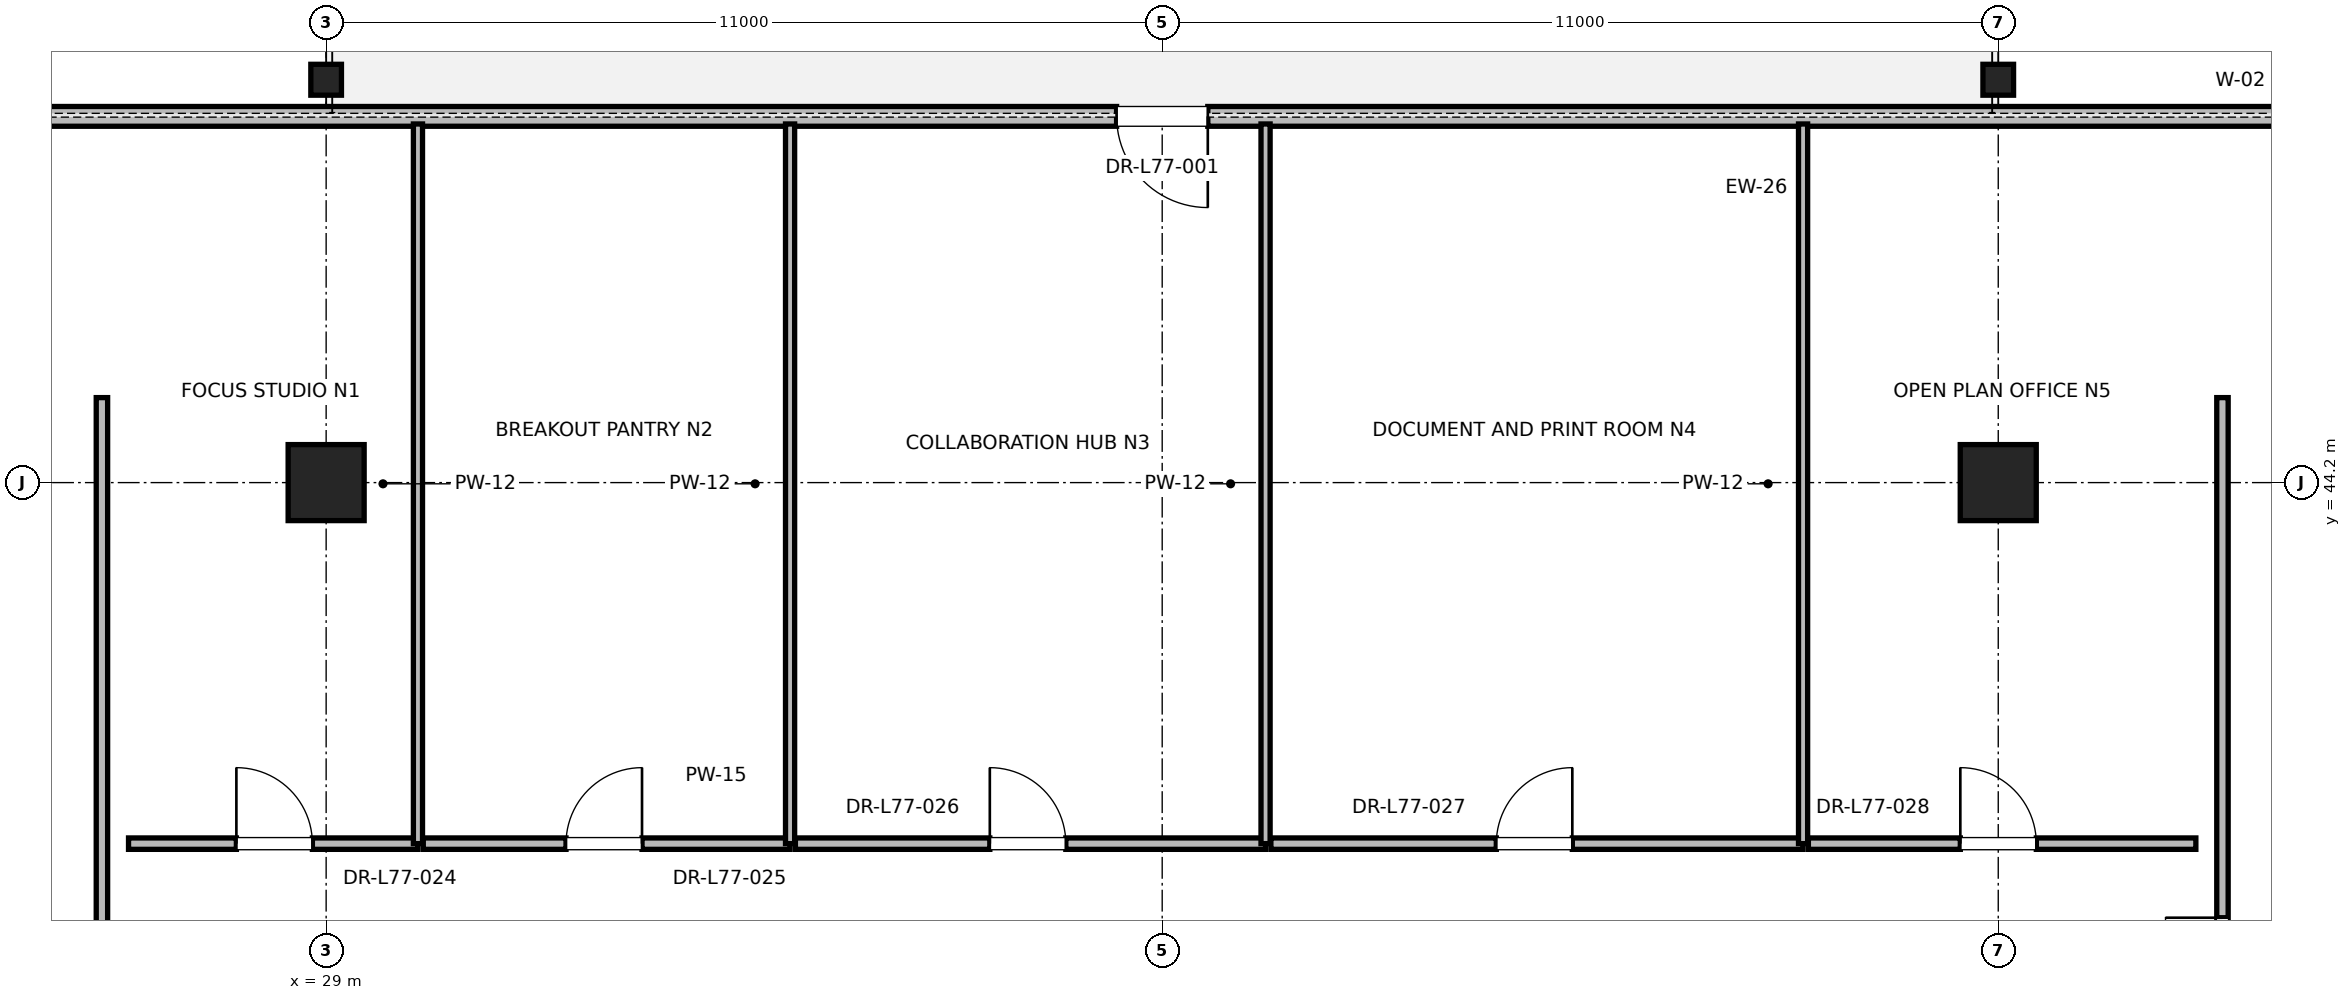
"""IFC4 building model, lengths in metres.
Left out: names, types, materials, properties, quantities, classifications, styles, units other than length and angle.
Written with IfcOpenShell. Run it as: python <this file> out.ifc"""

import sys

from ifc_helpers import new_model, si_unit, direction, frame, frame_2d, origin, origin_2d, place, context, subcontext, project, spatial, rectangle, i_section, extrude, element, fill, save


model = new_model("IFC4")
c1 = context("Model", 3, precision=1e-05, world=origin(), true_north=direction((0.0, 1.0)))
c2 = subcontext(c1, "Body", "Model", "MODEL_VIEW")
j1 = project(units=[si_unit("LENGTHUNIT", "METRE"), si_unit("PLANEANGLEUNIT", "RADIAN")], contexts=[c1])
p1 = place(None, origin())
s1 = spatial("IfcSite", under=j1, at=p1, CompositionType="ELEMENT")
p2 = place(p1, origin())
s2 = spatial("IfcBuilding", under=s1, at=p2, CompositionType="ELEMENT")
p3 = place(p2, frame((0.0, 0.0, 330.8)))
s3 = spatial("IfcBuildingStorey", under=s2, at=p3, CompositionType="ELEMENT", Elevation=330.8)
for number, where, z_axis, x_axis in (
    (1, (29.0, 44.2, 0.0), (0.0, 0.0, 1.0), (1.0, 0.0, 0.0)),
    (2, (51.0, 44.2, 0.0), (0.0, 0.0, 1.0), (1.0, 0.0, 0.0)),
):
    element("IfcColumn", number, at=place(p3, frame(where, z_axis=z_axis, x_axis=x_axis)), inside=s3, PredefinedType="COLUMN", context=c2, shape_type="SweptSolid", body=[
        extrude(rectangle(XDim=1.0, YDim=1.0, at=origin_2d()), origin(), (0.0, 0.0, 1.0), 4.0),
    ])
for number, where, z_axis, x_axis in (
    (3, (29.0, 49.5, 0.0), (0.0, 0.0, 1.0), (1.0, 0.0, 0.0)),
    (4, (51.0, 49.5, 0.0), (0.0, 0.0, 1.0), (1.0, 0.0, 0.0)),
):
    element("IfcColumn", number, at=place(p3, frame(where, z_axis=z_axis, x_axis=x_axis)), inside=s3, PredefinedType="COLUMN", context=c2, shape_type="SweptSolid", body=[
        extrude(i_section(OverallWidth=0.403, OverallDepth=0.406, WebThickness=0.027, FlangeThickness=0.043, FilletRadius=0.015, at=origin_2d()), origin(), (0.0, 0.0, 1.0), 4.0),
    ])
p4 = place(p3, frame((60.836, 49.018, 0.0), z_axis=(0.0, 0.0, 1.0), x_axis=(-1.0, 0.0, 0.0)))
e5 = element("IfcWall", 5, at=p4, inside=s3, PredefinedType="PARAPET", context=c2, shape_type="SweptSolid", body=[
    extrude(rectangle(XDim=41.673, YDim=0.26, at=frame_2d((20.836, 0.0))), origin(), (0.0, 0.0, 1.0), 3.196),
])
p5 = place(p4, frame((4.2, 0.0, 0.85)))
e6 = element("IfcOpeningElement", 6, at=p5, cuts=e5, PredefinedType="OPENING", context=c2, shape_type="SweptSolid", body=[
    extrude(rectangle(XDim=1.6, YDim=2.1, at=frame_2d((0.8, 1.05))), frame((0.0, 0.13, 0.0), z_axis=(0.0, -1.0, 0.0), x_axis=(1.0, 0.0, 0.0)), (0.0, 0.0, 1.0), 0.26),
])
p6 = place(p4, frame((20.236, 0.0, 0.0)))
e7 = element("IfcOpeningElement", 7, at=p6, cuts=e5, PredefinedType="OPENING", context=c2, shape_type="SweptSolid", body=[
    extrude(rectangle(XDim=1.2, YDim=2.2, at=frame_2d((0.6, 1.1))), frame((0.0, 0.13, 0.0), z_axis=(0.0, -1.0, 0.0), x_axis=(1.0, 0.0, 0.0)), (0.0, 0.0, 1.0), 0.26),
])
p7 = place(p4, frame((35.873, 0.0, 0.85)))
e8 = element("IfcOpeningElement", 8, at=p7, cuts=e5, PredefinedType="OPENING", context=c2, shape_type="SweptSolid", body=[
    extrude(rectangle(XDim=1.6, YDim=2.1, at=frame_2d((0.8, 1.05))), frame((0.0, 0.13, 0.0), z_axis=(0.0, -1.0, 0.0), x_axis=(1.0, 0.0, 0.0)), (0.0, 0.0, 1.0), 0.26),
])
p8 = place(p3, frame((26.4, 39.45, 0.0), z_axis=(0.0, 0.0, 1.0), x_axis=(1.0, 0.0, 0.0)))
e9 = element("IfcWall", 9, at=p8, inside=s3, PredefinedType="PARTITIONING", context=c2, shape_type="SweptSolid", body=[
    extrude(rectangle(XDim=3.808, YDim=0.15, at=frame_2d((1.904, 0.0))), origin(), (0.0, 0.0, 1.0), 2.85),
])
p9 = place(p8, frame((1.419, 0.0, 0.0)))
e10 = element("IfcOpeningElement", 10, at=p9, cuts=e9, PredefinedType="OPENING", context=c2, shape_type="SweptSolid", body=[
    extrude(rectangle(XDim=1.0, YDim=2.15, at=frame_2d((0.5, 1.075))), frame((0.0, 0.075, 0.0), z_axis=(0.0, -1.0, 0.0), x_axis=(1.0, 0.0, 0.0)), (0.0, 0.0, 1.0), 0.15),
])
p10 = place(p3, frame((30.208, 39.45, 0.0), z_axis=(0.0, 0.0, 1.0), x_axis=(0.0, 1.0, 0.0)))
e11 = element("IfcWall", 11, at=p10, inside=s3, PredefinedType="PARTITIONING", context=c2, shape_type="SweptSolid", body=[
    extrude(rectangle(XDim=9.468, YDim=0.12, at=frame_2d((4.734, 0.0))), origin(), (0.0, 0.0, 1.0), 2.415),
])
p11 = place(p3, frame((30.278, 39.45, 0.0), z_axis=(0.0, 0.0, 1.0), x_axis=(1.0, 0.0, 0.0)))
e12 = element("IfcWall", 12, at=p11, inside=s3, PredefinedType="PARTITIONING", context=c2, shape_type="SweptSolid", body=[
    extrude(rectangle(XDim=4.826, YDim=0.15, at=frame_2d((2.413, 0.0))), origin(), (0.0, 0.0, 1.0), 2.85),
])
p12 = place(p11, frame((1.878, 0.0, 0.0)))
e13 = element("IfcOpeningElement", 13, at=p12, cuts=e12, PredefinedType="OPENING", context=c2, shape_type="SweptSolid", body=[
    extrude(rectangle(XDim=1.0, YDim=2.15, at=frame_2d((0.5, 1.075))), frame((0.0, 0.075, 0.0), z_axis=(0.0, -1.0, 0.0), x_axis=(1.0, 0.0, 0.0)), (0.0, 0.0, 1.0), 0.15),
])
p13 = place(p3, frame((35.104, 39.45, 0.0), z_axis=(0.0, 0.0, 1.0), x_axis=(0.0, 1.0, 0.0)))
e14 = element("IfcWall", 14, at=p13, inside=s3, PredefinedType="PARTITIONING", context=c2, shape_type="SweptSolid", body=[
    extrude(rectangle(XDim=9.468, YDim=0.12, at=frame_2d((4.734, 0.0))), origin(), (0.0, 0.0, 1.0), 2.415),
])
p14 = place(p3, frame((35.174, 39.45, 0.0), z_axis=(0.0, 0.0, 1.0), x_axis=(1.0, 0.0, 0.0)))
e15 = element("IfcWall", 15, at=p14, inside=s3, PredefinedType="PARTITIONING", context=c2, shape_type="SweptSolid", body=[
    extrude(rectangle(XDim=6.186, YDim=0.15, at=frame_2d((3.093, 0.0))), origin(), (0.0, 0.0, 1.0), 2.85),
])
p15 = place(p14, frame((2.558, 0.0, 0.0)))
e16 = element("IfcOpeningElement", 16, at=p15, cuts=e15, PredefinedType="OPENING", context=c2, shape_type="SweptSolid", body=[
    extrude(rectangle(XDim=1.0, YDim=2.15, at=frame_2d((0.5, 1.075))), frame((0.0, 0.075, 0.0), z_axis=(0.0, -1.0, 0.0), x_axis=(1.0, 0.0, 0.0)), (0.0, 0.0, 1.0), 0.15),
])
p16 = place(p3, frame((41.36, 39.45, 0.0), z_axis=(0.0, 0.0, 1.0), x_axis=(0.0, 1.0, 0.0)))
e17 = element("IfcWall", 17, at=p16, inside=s3, PredefinedType="PARTITIONING", context=c2, shape_type="SweptSolid", body=[
    extrude(rectangle(XDim=9.468, YDim=0.12, at=frame_2d((4.734, 0.0))), origin(), (0.0, 0.0, 1.0), 2.415),
])
p17 = place(p3, frame((41.43, 39.45, 0.0), z_axis=(0.0, 0.0, 1.0), x_axis=(1.0, 0.0, 0.0)))
e18 = element("IfcWall", 18, at=p17, inside=s3, PredefinedType="PARTITIONING", context=c2, shape_type="SweptSolid", body=[
    extrude(rectangle(XDim=7.002, YDim=0.15, at=frame_2d((3.501, 0.0))), origin(), (0.0, 0.0, 1.0), 2.85),
])
p18 = place(p17, frame((2.966, 0.0, 0.0)))
e19 = element("IfcOpeningElement", 19, at=p18, cuts=e18, PredefinedType="OPENING", context=c2, shape_type="SweptSolid", body=[
    extrude(rectangle(XDim=1.0, YDim=2.15, at=frame_2d((0.5, 1.075))), frame((0.0, 0.075, 0.0), z_axis=(0.0, -1.0, 0.0), x_axis=(1.0, 0.0, 0.0)), (0.0, 0.0, 1.0), 0.15),
])
p19 = place(p3, frame((48.432, 39.45, 0.0), z_axis=(0.0, 0.0, 1.0), x_axis=(0.0, 1.0, 0.0)))
e20 = element("IfcWall", 20, at=p19, inside=s3, PredefinedType="PARTITIONING", context=c2, shape_type="SweptSolid", body=[
    extrude(rectangle(XDim=9.468, YDim=0.12, at=frame_2d((4.734, 0.0))), origin(), (0.0, 0.0, 1.0), 2.415),
])
p20 = place(p3, frame((48.502, 39.45, 0.0), z_axis=(0.0, 0.0, 1.0), x_axis=(1.0, 0.0, 0.0)))
e21 = element("IfcWall", 21, at=p20, inside=s3, PredefinedType="PARTITIONING", context=c2, shape_type="SweptSolid", body=[
    extrude(rectangle(XDim=5.098, YDim=0.15, at=frame_2d((2.549, 0.0))), origin(), (0.0, 0.0, 1.0), 2.85),
])
p21 = place(p20, frame((1.999, 0.0, 0.0)))
e22 = element("IfcOpeningElement", 22, at=p21, cuts=e21, PredefinedType="OPENING", context=c2, shape_type="SweptSolid", body=[
    extrude(rectangle(XDim=1.0, YDim=2.15, at=frame_2d((0.5, 1.075))), frame((0.0, 0.075, 0.0), z_axis=(0.0, -1.0, 0.0), x_axis=(1.0, 0.0, 0.0)), (0.0, 0.0, 1.0), 0.15),
])
p22 = place(p3, frame((26.05, 33.272, 0.0), z_axis=(0.0, 0.0, 1.0), x_axis=(0.0, 1.0, 0.0)))
e23 = element("IfcWall", 23, at=p22, inside=s3, PredefinedType="PARTITIONING", context=c2, shape_type="SweptSolid", body=[
    extrude(rectangle(XDim=12.046, YDim=0.15, at=frame_2d((6.023, 0.0))), origin(), (0.0, 0.0, 1.0), 2.85),
])
p23 = place(p22, frame((1.064, 0.0, 0.0)))
e24 = element("IfcOpeningElement", 24, at=p23, cuts=e23, PredefinedType="OPENING", context=c2, shape_type="SweptSolid", body=[
    extrude(rectangle(XDim=1.0, YDim=2.15, at=frame_2d((0.5, 1.075))), frame((0.0, 0.075, 0.0), z_axis=(0.0, -1.0, 0.0), x_axis=(1.0, 0.0, 0.0)), (0.0, 0.0, 1.0), 0.15),
])
p24 = place(p3, frame((53.95, 36.835, 0.0), z_axis=(0.0, 0.0, 1.0), x_axis=(0.0, 1.0, 0.0)))
e25 = element("IfcWall", 25, at=p24, inside=s3, PredefinedType="PARTITIONING", context=c2, shape_type="SweptSolid", body=[
    extrude(rectangle(XDim=8.483, YDim=0.15, at=frame_2d((4.241, 0.0))), origin(), (0.0, 0.0, 1.0), 2.85),
])
p25 = place(p24, frame((0.14, 0.0, 0.0)))
e26 = element("IfcOpeningElement", 26, at=p25, cuts=e25, PredefinedType="OPENING", context=c2, shape_type="SweptSolid", body=[
    extrude(rectangle(XDim=1.5, YDim=2.25, at=frame_2d((0.75, 1.125))), frame((0.0, 0.075, 0.0), z_axis=(0.0, -1.0, 0.0), x_axis=(1.0, 0.0, 0.0)), (0.0, 0.0, 1.0), 0.15),
])
p26 = place(p6, origin())
e27 = element("IfcDoor", 27, at=p26, inside=s3, OperationType="SINGLE_SWING_LEFT", PredefinedType="DOOR", context=c2, shape_type="SweptSolid", body=[
    extrude(rectangle(XDim=1.2, YDim=2.2, at=frame_2d((0.6, 1.1))), frame((0.0, 0.025, 0.0), z_axis=(0.0, -1.0, 0.0), x_axis=(1.0, 0.0, 0.0)), (0.0, 0.0, 1.0), 0.05),
])
fill(e7, e27)
p27 = place(p9, origin())
e28 = element("IfcDoor", 28, at=p27, inside=s3, OperationType="SINGLE_SWING_LEFT", PredefinedType="DOOR", context=c2, shape_type="SweptSolid", body=[
    extrude(rectangle(XDim=1.0, YDim=2.15, at=frame_2d((0.5, 1.075))), frame((0.0, 0.025, 0.0), z_axis=(0.0, -1.0, 0.0), x_axis=(1.0, 0.0, 0.0)), (0.0, 0.0, 1.0), 0.05),
])
fill(e10, e28)
p28 = place(p12, origin())
e29 = element("IfcDoor", 29, at=p28, inside=s3, OperationType="SINGLE_SWING_RIGHT", PredefinedType="DOOR", context=c2, shape_type="SweptSolid", body=[
    extrude(rectangle(XDim=1.0, YDim=2.15, at=frame_2d((0.5, 1.075))), frame((0.0, 0.025, 0.0), z_axis=(0.0, -1.0, 0.0), x_axis=(1.0, 0.0, 0.0)), (0.0, 0.0, 1.0), 0.05),
])
fill(e13, e29)
p29 = place(p15, origin())
e30 = element("IfcDoor", 30, at=p29, inside=s3, OperationType="SINGLE_SWING_LEFT", PredefinedType="DOOR", context=c2, shape_type="SweptSolid", body=[
    extrude(rectangle(XDim=1.0, YDim=2.15, at=frame_2d((0.5, 1.075))), frame((0.0, 0.025, 0.0), z_axis=(0.0, -1.0, 0.0), x_axis=(1.0, 0.0, 0.0)), (0.0, 0.0, 1.0), 0.05),
])
fill(e16, e30)
p30 = place(p18, origin())
e31 = element("IfcDoor", 31, at=p30, inside=s3, OperationType="SINGLE_SWING_RIGHT", PredefinedType="DOOR", context=c2, shape_type="SweptSolid", body=[
    extrude(rectangle(XDim=1.0, YDim=2.15, at=frame_2d((0.5, 1.075))), frame((0.0, 0.025, 0.0), z_axis=(0.0, -1.0, 0.0), x_axis=(1.0, 0.0, 0.0)), (0.0, 0.0, 1.0), 0.05),
])
fill(e19, e31)
p31 = place(p21, origin())
e32 = element("IfcDoor", 32, at=p31, inside=s3, OperationType="SINGLE_SWING_LEFT", PredefinedType="DOOR", context=c2, shape_type="SweptSolid", body=[
    extrude(rectangle(XDim=1.0, YDim=2.15, at=frame_2d((0.5, 1.075))), frame((0.0, 0.025, 0.0), z_axis=(0.0, -1.0, 0.0), x_axis=(1.0, 0.0, 0.0)), (0.0, 0.0, 1.0), 0.05),
])
fill(e22, e32)
p32 = place(p25, origin())
e33 = element("IfcDoor", 33, at=p32, inside=s3, OperationType="DOUBLE_DOOR_SINGLE_SWING", PredefinedType="DOOR", context=c2, shape_type="SweptSolid", body=[
    extrude(rectangle(XDim=1.5, YDim=2.25, at=frame_2d((0.75, 1.125))), frame((0.0, 0.025, 0.0), z_axis=(0.0, -1.0, 0.0), x_axis=(1.0, 0.0, 0.0)), (0.0, 0.0, 1.0), 0.05),
])
fill(e26, e33)
save(model, sys.argv[1])
